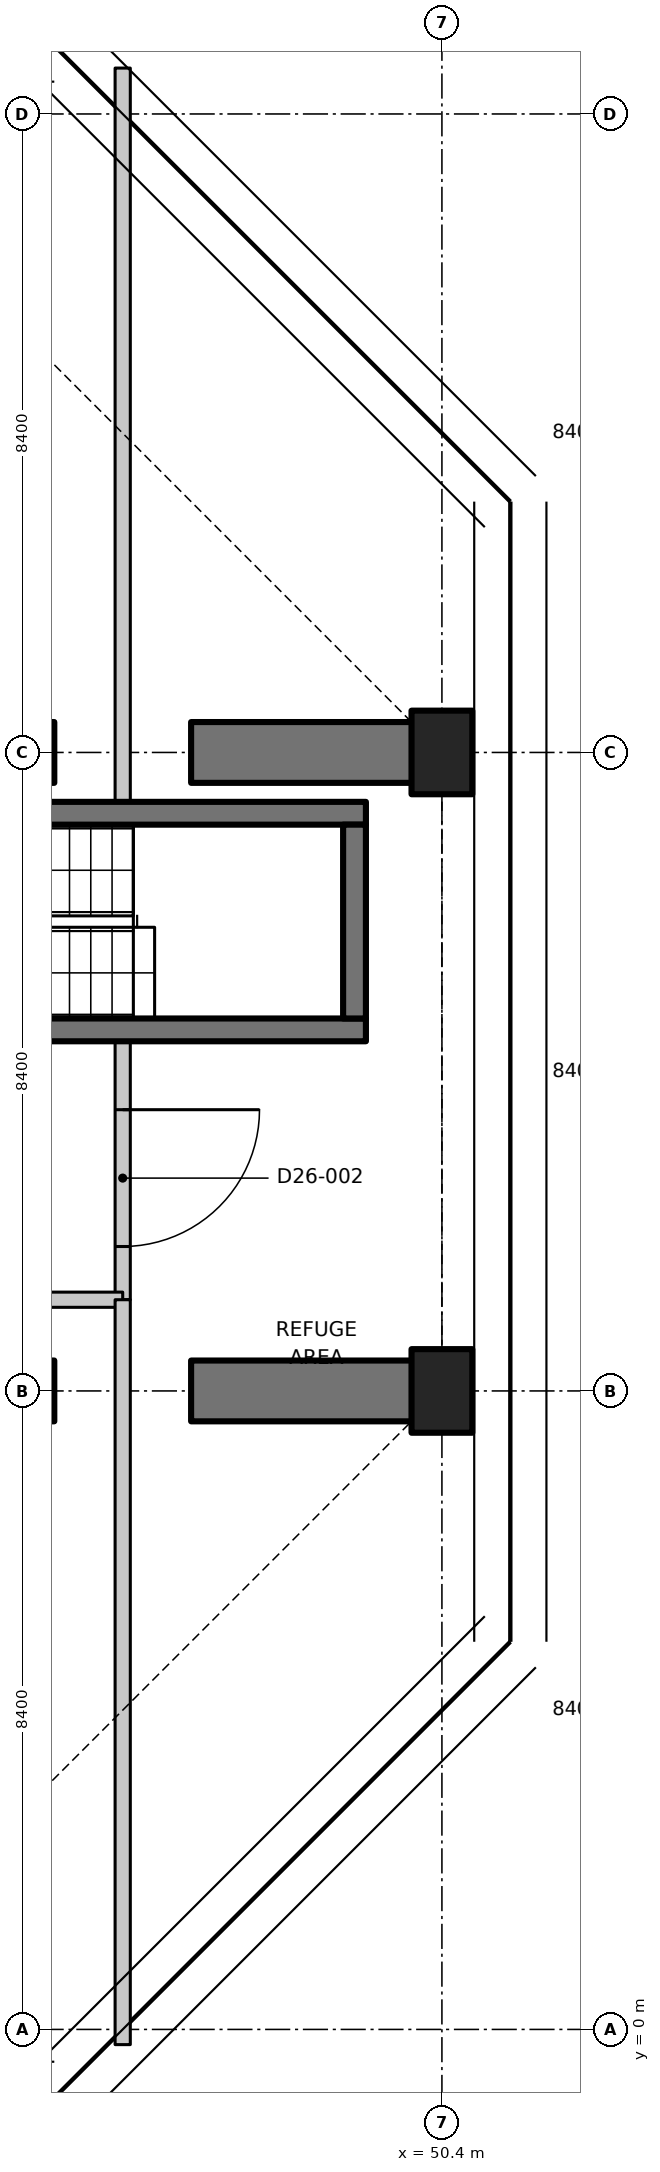
"""IFC4 building model, lengths in metres.
Left out: names, types, materials, properties, quantities, classifications, styles, units other than length and angle.
Written with IfcOpenShell. Run it as: python <this file> out.ifc"""

import sys

from ifc_helpers import new_model, si_unit, direction, frame, frame_2d, origin, origin_2d, place, context, subcontext, project, spatial, polyline, rectangle, outline, extrude, element, fill, save


model = new_model("IFC4")
c1 = context("Model", 3, precision=1e-05, world=origin(), true_north=direction((0.0, 1.0)))
c2 = subcontext(c1, "Body", "Model", "MODEL_VIEW")
j1 = project(units=[si_unit("LENGTHUNIT", "METRE"), si_unit("PLANEANGLEUNIT", "RADIAN")], contexts=[c1])
p1 = place(None, origin())
s1 = spatial("IfcSite", under=j1, at=p1, CompositionType="ELEMENT")
p2 = place(p1, origin())
s2 = spatial("IfcBuilding", under=s1, at=p2, CompositionType="ELEMENT")
p3 = place(p2, frame((0.0, 0.0, 210.9)))
s3 = spatial("IfcBuildingStorey", under=s2, at=p3, CompositionType="ELEMENT", Elevation=210.9)
for number, where, z_axis, x_axis in (
    (1, (50.4, 8.4, 0.0), (0.0, 0.0, 1.0), (1.0, 0.0, 0.0)),
    (2, (50.4, 16.8, 0.0), (0.0, 0.0, 1.0), (1.0, 0.0, 0.0)),
):
    element("IfcColumn", number, at=place(p3, frame(where, z_axis=z_axis, x_axis=x_axis)), inside=s3, PredefinedType="COLUMN", context=c2, shape_type="SweptSolid", body=[
        extrude(rectangle(XDim=0.8, YDim=1.1, at=origin_2d()), origin(), (0.0, 0.0, 1.0), 4.55),
    ])
for number, where, z_axis, x_axis in (
    (3, (42.37, 8.4, 0.0), (0.0, 0.0, 1.0), (1.0, 0.0, 0.0)),
    (4, (47.1, 8.4, 0.0), (0.0, 0.0, 1.0), (1.0, 0.0, 0.0)),
    (5, (42.37, 16.8, 0.0), (0.0, 0.0, 1.0), (1.0, 0.0, 0.0)),
    (6, (47.1, 16.8, 0.0), (0.0, 0.0, 1.0), (1.0, 0.0, 0.0)),
):
    element("IfcWall", number, at=place(p3, frame(where, z_axis=z_axis, x_axis=x_axis)), inside=s3, PredefinedType="SHEAR", context=c2, shape_type="SweptSolid", body=[
        extrude(rectangle(XDim=2.93, YDim=0.8, at=frame_2d((1.465, 0.0))), origin(), (0.0, 0.0, 1.0), 4.55),
    ])
p4 = place(p3, frame((49.4, 13.15, 0.0), z_axis=(0.0, 0.0, 1.0), x_axis=(-1.0, 0.0, 0.0)))
e7 = element("IfcWall", 7, at=p4, inside=s3, PredefinedType="SHEAR", context=c2, shape_type="SweptSolid", body=[
    extrude(rectangle(XDim=8.2, YDim=0.3, at=frame_2d((4.1, 0.0))), origin(), (0.0, 0.0, 1.0), 4.55),
])
p5 = place(p4, frame((6.8, 0.0, 0.0)))
e8 = element("IfcOpeningElement", 8, at=p5, cuts=e7, PredefinedType="OPENING", context=c2, shape_type="SweptSolid", body=[
    extrude(rectangle(XDim=1.0, YDim=2.1, at=frame_2d((0.5, 1.05))), frame((0.0, 0.16, 0.0), z_axis=(0.0, -1.0, 0.0), x_axis=(1.0, 0.0, 0.0)), (0.0, 0.0, 1.0), 0.32),
])
p6 = place(p3, frame((41.2, 16.0, 0.0), z_axis=(0.0, 0.0, 1.0), x_axis=(1.0, 0.0, 0.0)))
e9 = element("IfcWall", 9, at=p6, inside=s3, PredefinedType="SHEAR", context=c2, shape_type="SweptSolid", body=[
    extrude(rectangle(XDim=8.2, YDim=0.3, at=frame_2d((4.1, 0.0))), origin(), (0.0, 0.0, 1.0), 4.55),
])
p7 = place(p3, frame((49.25, 13.3, 0.0), z_axis=(0.0, 0.0, 1.0), x_axis=(0.0, 1.0, 0.0)))
e10 = element("IfcWall", 10, at=p7, inside=s3, PredefinedType="SHEAR", context=c2, shape_type="SweptSolid", body=[
    extrude(rectangle(XDim=2.55, YDim=0.3, at=frame_2d((1.275, 0.0))), origin(), (0.0, 0.0, 1.0), 4.55),
])
p8 = place(p3, frame((46.2, 13.0, 0.0), z_axis=(0.0, 0.0, 1.0), x_axis=(0.0, -1.0, 0.0)))
e11 = element("IfcWall", 11, at=p8, inside=s3, PredefinedType="PARTITIONING", context=c2, shape_type="SweptSolid", body=[
    extrude(rectangle(XDim=3.4, YDim=0.2, at=frame_2d((1.7, 0.0))), origin(), (0.0, 0.0, 1.0), 4.53),
])
p9 = place(p8, frame((0.9, 0.0, 0.0)))
e12 = element("IfcOpeningElement", 12, at=p9, cuts=e11, PredefinedType="OPENING", context=c2, shape_type="SweptSolid", body=[
    extrude(rectangle(XDim=1.8, YDim=2.1, at=frame_2d((0.9, 1.05))), frame((0.0, 0.11, 0.0), z_axis=(0.0, -1.0, 0.0), x_axis=(1.0, 0.0, 0.0)), (0.0, 0.0, 1.0), 0.22),
])
p10 = place(p3, frame((46.2, 9.6, 0.0), z_axis=(0.0, 0.0, 1.0), x_axis=(-1.0, 0.0, 0.0)))
e13 = element("IfcWall", 13, at=p10, inside=s3, PredefinedType="PARTITIONING", context=c2, shape_type="SweptSolid", body=[
    extrude(rectangle(XDim=8.4, YDim=0.2, at=frame_2d((4.2, 0.0))), origin(), (0.0, 0.0, 1.0), 4.53),
])
p11 = place(p3, frame((46.2, -0.2, 0.0), z_axis=(0.0, 0.0, 1.0), x_axis=(0.0, 1.0, 0.0)))
e14 = element("IfcWall", 14, at=p11, inside=s3, PredefinedType="PARTITIONING", context=c2, shape_type="SweptSolid", body=[
    extrude(outline(polyline([(0.0, 0.0), (9.8, 0.0), (9.8, 4.53), (5.116, 4.53), (5.114, 4.18), (3.686, 4.18), (3.684, 4.53), (0.0, 4.53), (0.0, 0.0)])), frame((0.0, 0.1, 0.0), z_axis=(0.0, -1.0, 0.0), x_axis=(1.0, 0.0, 0.0)), (0.0, 0.0, 1.0), 0.2),
])
p12 = place(p3, frame((46.2, 16.15, 0.0), z_axis=(0.0, 0.0, 1.0), x_axis=(0.0, 1.0, 0.0)))
e15 = element("IfcWall", 15, at=p12, inside=s3, PredefinedType="PARTITIONING", context=c2, shape_type="SweptSolid", body=[
    extrude(outline(polyline([(0.0, 0.0), (9.654, 0.0), (9.654, 4.53), (9.25, 4.53), (5.566, 4.53), (5.564, 4.18), (4.136, 4.18), (4.134, 4.53), (0.0, 4.53), (0.0, 0.0)])), frame((0.0, 0.1, 0.0), z_axis=(0.0, -1.0, 0.0), x_axis=(1.0, 0.0, 0.0)), (0.0, 0.0, 1.0), 0.2),
])
p13 = place(p9, origin())
e16 = element("IfcDoor", 16, at=p13, inside=s3, OperationType="DOUBLE_DOOR_SINGLE_SWING", PredefinedType="DOOR", context=c2, shape_type="SweptSolid", body=[
    extrude(rectangle(XDim=1.8, YDim=2.1, at=frame_2d((0.9, 1.05))), frame((0.0, 0.025, 0.0), z_axis=(0.0, -1.0, 0.0), x_axis=(1.0, 0.0, 0.0)), (0.0, 0.0, 1.0), 0.05),
])
fill(e12, e16)
save(model, sys.argv[1])
